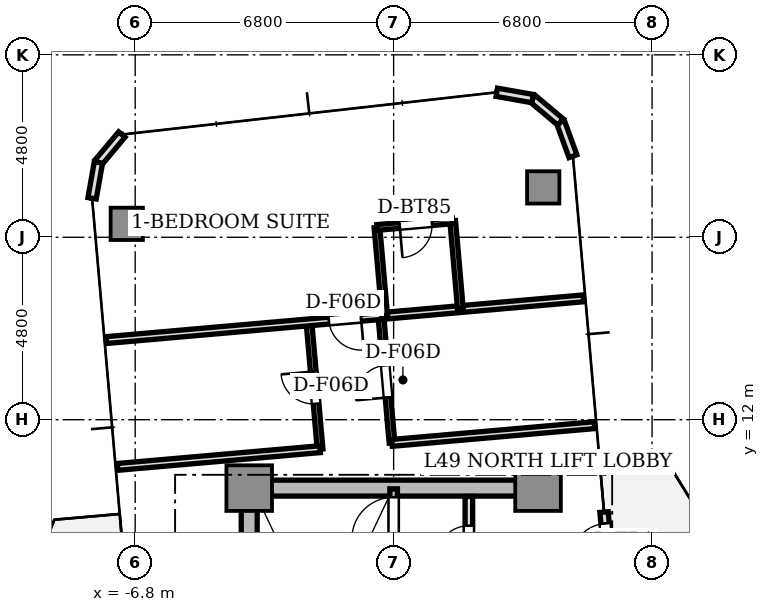
"""IFC4 building model, lengths in metres.
Left out: names, types, materials, properties, quantities, classifications, styles, units other than length and angle.
Written with IfcOpenShell. Run it as: python <this file> out.ifc"""

import sys

from ifc_helpers import new_model, si_unit, direction, frame, frame_2d, origin, origin_2d, place, context, subcontext, project, spatial, rectangle, extrude, source, transform, mapped, element, fill, save


model = new_model("IFC4")
c1 = context("Model", 3, precision=1e-05, world=origin(), true_north=direction((0.0, 1.0)))
c2 = subcontext(c1, "Body", "Model", "MODEL_VIEW")
j1 = project(units=[si_unit("LENGTHUNIT", "METRE"), si_unit("PLANEANGLEUNIT", "RADIAN")], contexts=[c1])
p1 = place(None, origin())
s1 = spatial("IfcSite", under=j1, at=p1, CompositionType="ELEMENT")
p2 = place(p1, origin())
s2 = spatial("IfcBuilding", under=s1, at=p2, CompositionType="ELEMENT")
p3 = place(p2, frame((0.0, 0.0, 178.55)))
s3 = spatial("IfcBuildingStorey", under=s2, at=p3, CompositionType="ELEMENT", Elevation=178.55)
p4 = place(p3, frame((-3.55, 10.2, 0.0), z_axis=(0.0, 0.0, 1.0), x_axis=(1.0, 0.0, 0.0)))
e1 = element("IfcWall", 1, at=p4, inside=s3, PredefinedType="SHEAR", context=c2, shape_type="SweptSolid", body=[
    extrude(rectangle(XDim=7.1, YDim=0.42, at=frame_2d((3.55, 0.0))), origin(), (0.0, 0.0, 1.0), 3.11),
])
p5 = place(p3, frame((-3.8, 2.85, 0.0), z_axis=(0.0, 0.0, 1.0), x_axis=(0.0, 1.0, 0.0)))
e2 = element("IfcWall", 2, at=p5, inside=s3, PredefinedType="SHEAR", context=c2, shape_type="SweptSolid", body=[
    extrude(rectangle(XDim=6.9, YDim=0.42, at=frame_2d((3.45, 0.0))), origin(), (0.0, 0.0, 1.0), 3.11),
])
m1 = source(origin(), c2, "Body", "SweptSolid", [
    extrude(rectangle(XDim=1.2, YDim=1.2, at=origin_2d()), origin(), (0.0, 0.0, 1.0), 3.11),
])
for number, where, z_axis, x_axis in (
    (3, (-3.8, 10.2, 0.0), (0.0, 0.0, 1.0), (1.0, 0.0, 0.0)),
    (4, (3.8, 10.2, 0.0), (0.0, 0.0, 1.0), (1.0, 0.0, 0.0)),
):
    element("IfcColumn", number, at=place(p3, frame(where, z_axis=z_axis, x_axis=x_axis)), inside=s3, PredefinedType="COLUMN", context=c2, shape_type="MappedRepresentation", body=[
        mapped(m1, transform((0.0, 0.0, 0.0), scale=1.0)),
    ])
m2 = source(origin(), c2, "Body", "SweptSolid", [
    extrude(rectangle(XDim=0.85, YDim=0.85, at=origin_2d()), origin(), (0.0, 0.0, 1.0), 3.11),
])
for number, where, z_axis, x_axis in (
    (5, (3.936, 18.112, 0.0), (0.0, 0.0, 1.0), (1.0, 0.0, 0.0)),
    (6, (-7.022, 17.153, 0.0), (0.0, 0.0, 1.0), (1.0, 0.0, 0.0)),
):
    element("IfcColumn", number, at=place(p3, frame(where, z_axis=z_axis, x_axis=x_axis)), inside=s3, PredefinedType="COLUMN", context=c2, shape_type="MappedRepresentation", body=[
        mapped(m2, transform((0.0, 0.0, 0.0), scale=1.0)),
    ])
p6 = place(p3, frame((5.772, 6.879, 0.0), z_axis=(0.0, 0.0, 1.0), x_axis=(-0.087168071984, 0.996193619346, 0.0)))
e7 = element("IfcWall", 7, at=p6, inside=s3, PredefinedType="STANDARD", context=c2, shape_type="SweptSolid", body=[
    extrude(rectangle(XDim=2.7, YDim=0.22, at=frame_2d((1.35, 0.0))), origin(), (0.0, 0.0, 1.0), 3.11),
])
p7 = place(p6, frame((1.4, 0.0, 0.0)))
e8 = element("IfcOpeningElement", 8, at=p7, cuts=e7, PredefinedType="OPENING", context=c2, shape_type="SweptSolid", body=[
    extrude(rectangle(XDim=1.0, YDim=2.2, at=frame_2d((0.5, 1.1))), frame((0.0, 0.12, 0.0), z_axis=(0.0, -1.0, 0.0), x_axis=(1.0, 0.0, 0.0)), (0.0, 0.0, 1.0), 0.24),
])
p8 = place(p3, frame((4.718, 18.933, 0.0), z_axis=(0.0, 0.0, 1.0), x_axis=(-0.34188635151, 0.939741306239, 0.0)))
e9 = element("IfcWall", 9, at=p8, inside=s3, PredefinedType="STANDARD", context=c2, shape_type="SweptSolid", body=[
    extrude(rectangle(XDim=0.958, YDim=0.22, at=frame_2d((0.479, 0.0))), origin(), (0.0, 0.0, 1.0), 3.11),
])
for number, where, z_axis, x_axis in (
    (10, (4.39, 19.833, 0.0), (0.0, 0.0, 1.0), (-0.766, 0.643, 0.0)),
    (11, (3.657, 20.449, 0.0), (0.0, 0.0, 1.0), (-0.985, 0.174, 0.0)),
):
    element("IfcWall", number, at=place(p3, frame(where, z_axis=z_axis, x_axis=x_axis)), inside=s3, PredefinedType="STANDARD", context=c2, shape_type="SweptSolid", body=[
        extrude(rectangle(XDim=0.958, YDim=0.22, at=frame_2d((0.479, 0.0))), origin(), (0.0, 0.0, 1.0), 3.11),
    ])
for number, where, z_axis, x_axis in (
    (12, (-7.152, 19.503, 0.0), (0.0, 0.0, 1.0), (-0.643, -0.766, 0.0)),
    (13, (-7.768, 18.769, 0.0), (0.0, 0.0, 1.0), (-0.174, -0.985, 0.0)),
):
    element("IfcWall", number, at=place(p3, frame(where, z_axis=z_axis, x_axis=x_axis)), inside=s3, PredefinedType="STANDARD", context=c2, shape_type="SweptSolid", body=[
        extrude(rectangle(XDim=0.958, YDim=0.22, at=frame_2d((0.479, 0.0))), origin(), (0.0, 0.0, 1.0), 3.11),
    ])
p9 = place(p3, frame((0.0, 2.5, 0.0), z_axis=(0.0, 0.0, 1.0), x_axis=(0.0, 1.0, 0.0)))
e14 = element("IfcWall", 14, at=p9, inside=s3, PredefinedType="SOLIDWALL", context=c2, shape_type="SweptSolid", body=[
    extrude(rectangle(XDim=7.68, YDim=0.2, at=frame_2d((3.84, 0.0))), origin(), (0.0, 0.0, 1.0), 3.11),
])
p10 = place(p9, frame((6.36, 0.0, 0.0)))
e15 = element("IfcOpeningElement", 15, at=p10, cuts=e14, PredefinedType="OPENING", context=c2, shape_type="SweptSolid", body=[
    extrude(rectangle(XDim=1.1, YDim=2.15, at=frame_2d((0.55, 1.075))), frame((0.0, 0.11, 0.0), z_axis=(0.0, -1.0, 0.0), x_axis=(1.0, 0.0, 0.0)), (0.0, 0.0, 1.0), 0.22),
])
p11 = place(p3, frame((1.98, 5.32, 0.0), z_axis=(0.0, 0.0, 1.0), x_axis=(0.0, 1.0, 0.0)))
e16 = element("IfcWall", 16, at=p11, inside=s3, PredefinedType="SOLIDWALL", context=c2, shape_type="SweptSolid", body=[
    extrude(rectangle(XDim=4.66, YDim=0.2, at=frame_2d((2.33, 0.0))), origin(), (0.0, 0.0, 1.0), 2.66),
])
p12 = place(p11, frame((3.04, 0.0, 0.0)))
e17 = element("IfcOpeningElement", 17, at=p12, cuts=e16, PredefinedType="OPENING", context=c2, shape_type="SweptSolid", body=[
    extrude(rectangle(XDim=0.85, YDim=2.1, at=frame_2d((0.425, 1.05))), frame((0.0, 0.11, 0.0), z_axis=(0.0, -1.0, 0.0), x_axis=(1.0, 0.0, 0.0)), (0.0, 0.0, 1.0), 0.22),
])
p13 = place(p3, frame((-1.936, 11.224, 0.0), z_axis=(0.0, 0.0, 1.0), x_axis=(-0.087164238054, 0.996193954812, 0.0)))
e18 = element("IfcWall", 18, at=p13, inside=s3, PredefinedType="PARTITIONING", context=c2, shape_type="SweptSolid", body=[
    extrude(rectangle(XDim=3.35, YDim=0.15, at=frame_2d((1.675, 0.0))), origin(), (0.0, 0.0, 1.0), 2.66),
])
p14 = place(p13, frame((1.2, 0.0, 0.0)))
e19 = element("IfcOpeningElement", 19, at=p14, cuts=e18, PredefinedType="OPENING", context=c2, shape_type="SweptSolid", body=[
    extrude(rectangle(XDim=0.85, YDim=2.1, at=frame_2d((0.425, 1.05))), frame((0.0, 0.085, 0.0), z_axis=(0.0, -1.0, 0.0), x_axis=(1.0, 0.0, 0.0)), (0.0, 0.0, 1.0), 0.17),
])
p15 = place(p3, frame((-0.043, 11.39, 0.0), z_axis=(0.0, 0.0, 1.0), x_axis=(-0.087164238054, 0.996193954812, 0.0)))
e20 = element("IfcWall", 20, at=p15, inside=s3, PredefinedType="PARTITIONING", context=c2, shape_type="SweptSolid", body=[
    extrude(rectangle(XDim=3.35, YDim=0.15, at=frame_2d((1.675, 0.0))), origin(), (0.0, 0.0, 1.0), 2.66),
])
p16 = place(p15, frame((1.2, 0.0, 0.0)))
e21 = element("IfcOpeningElement", 21, at=p16, cuts=e20, PredefinedType="OPENING", context=c2, shape_type="SweptSolid", body=[
    extrude(rectangle(XDim=0.85, YDim=2.1, at=frame_2d((0.425, 1.05))), frame((0.0, 0.085, 0.0), z_axis=(0.0, -1.0, 0.0), x_axis=(1.0, 0.0, 0.0)), (0.0, 0.0, 1.0), 0.17),
])
for number, where, z_axis, x_axis in (
    (22, (-1.936, 11.224, 0.0), (0.0, 0.0, 1.0), (-0.996, -0.087, 0.0)),
    (23, (5.287, 11.856, 0.0), (0.0, 0.0, 1.0), (-0.996, -0.087, 0.0)),
):
    element("IfcWall", number, at=place(p3, frame(where, z_axis=z_axis, x_axis=x_axis)), inside=s3, PredefinedType="PARTITIONING", context=c2, shape_type="SweptSolid", body=[
        extrude(rectangle(XDim=5.35, YDim=0.18, at=frame_2d((2.675, 0.0))), origin(), (0.0, 0.0, 1.0), 2.66),
    ])
p17 = place(p3, frame((4.995, 15.193, 0.0), z_axis=(0.0, 0.0, 1.0), x_axis=(-0.996194790044, -0.087154691724, 0.0)))
e24 = element("IfcWall", 24, at=p17, inside=s3, PredefinedType="PARTITIONING", context=c2, shape_type="SweptSolid", body=[
    extrude(rectangle(XDim=12.6, YDim=0.18, at=frame_2d((6.3, 0.0))), origin(), (0.0, 0.0, 1.0), 2.66),
])
p18 = place(p17, frame((5.875, 0.0, 0.0)))
e25 = element("IfcOpeningElement", 25, at=p18, cuts=e24, PredefinedType="OPENING", context=c2, shape_type="SweptSolid", body=[
    extrude(rectangle(XDim=0.85, YDim=2.1, at=frame_2d((0.425, 1.05))), frame((0.0, 0.1, 0.0), z_axis=(0.0, -1.0, 0.0), x_axis=(1.0, 0.0, 0.0)), (0.0, 0.0, 1.0), 0.2),
])
for number, where, z_axis, x_axis in (
    (26, (-0.235, 14.736, 0.0), (0.0, 0.0, 1.0), (-0.087, 0.996, 0.0)),
    (27, (1.757, 14.91, 0.0), (0.0, 0.0, 1.0), (-0.087, 0.996, 0.0)),
):
    element("IfcWall", number, at=place(p3, frame(where, z_axis=z_axis, x_axis=x_axis)), inside=s3, PredefinedType="PARTITIONING", context=c2, shape_type="SweptSolid", body=[
        extrude(rectangle(XDim=2.331, YDim=0.15, at=frame_2d((1.166, 0.0))), origin(), (0.0, 0.0, 1.0), 2.66),
    ])
p19 = place(p3, frame((1.554, 17.232, 0.0), z_axis=(0.0, 0.0, 1.0), x_axis=(-0.996193717496, -0.087166950281, 0.0)))
e28 = element("IfcWall", 28, at=p19, inside=s3, PredefinedType="PARTITIONING", context=c2, shape_type="SweptSolid", body=[
    extrude(rectangle(XDim=2.0, YDim=0.15, at=frame_2d((1.0, 0.0))), origin(), (0.0, 0.0, 1.0), 2.66),
])
p20 = place(p19, frame((0.55, 0.0, 0.0)))
e29 = element("IfcOpeningElement", 29, at=p20, cuts=e28, PredefinedType="OPENING", context=c2, shape_type="SweptSolid", body=[
    extrude(rectangle(XDim=0.85, YDim=2.1, at=frame_2d((0.425, 1.05))), frame((0.0, 0.085, 0.0), z_axis=(0.0, -1.0, 0.0), x_axis=(1.0, 0.0, 0.0)), (0.0, 0.0, 1.0), 0.17),
])
m3 = source(origin(), c2, "Body", "SweptSolid", [
    extrude(rectangle(XDim=1.0, YDim=0.05, at=origin_2d()), origin(), (0.0, 0.0, 1.0), 2.2),
])
p21 = place(p7, frame((0.5, 0.0, 0.0)))
e30 = element("IfcDoor", 30, at=p21, inside=s3, OperationType="SINGLE_SWING_LEFT", PredefinedType="DOOR", context=c2, shape_type="MappedRepresentation", body=[
    mapped(m3, transform((0.0, 0.0, 0.0), scale=1.0)),
])
fill(e8, e30)
m4 = source(origin(), c2, "Body", "SweptSolid", [
    extrude(rectangle(XDim=1.1, YDim=0.05, at=origin_2d()), origin(), (0.0, 0.0, 1.0), 2.15),
])
p22 = place(p10, frame((0.55, 0.0, 0.0)))
e31 = element("IfcDoor", 31, at=p22, inside=s3, OperationType="SINGLE_SWING_LEFT", PredefinedType="DOOR", context=c2, shape_type="MappedRepresentation", body=[
    mapped(m4, transform((0.0, 0.0, 0.0), scale=1.0)),
])
fill(e15, e31)
m5 = source(origin(), c2, "Body", "SweptSolid", [
    extrude(rectangle(XDim=0.85, YDim=0.05, at=origin_2d()), origin(), (0.0, 0.0, 1.0), 2.1),
])
p23 = place(p12, frame((0.425, 0.0, 0.0)))
e32 = element("IfcDoor", 32, at=p23, inside=s3, OperationType="SINGLE_SWING_LEFT", PredefinedType="DOOR", context=c2, shape_type="MappedRepresentation", body=[
    mapped(m5, transform((0.0, 0.0, 0.0), scale=1.0)),
])
fill(e17, e32)
p24 = place(p14, frame((0.425, 0.0, 0.0)))
e33 = element("IfcDoor", 33, at=p24, inside=s3, OperationType="SINGLE_SWING_RIGHT", PredefinedType="DOOR", context=c2, shape_type="MappedRepresentation", body=[
    mapped(m5, transform((0.0, 0.0, 0.0), scale=1.0)),
])
fill(e19, e33)
p25 = place(p16, frame((0.425, 0.0, 0.0)))
e34 = element("IfcDoor", 34, at=p25, inside=s3, OperationType="SINGLE_SWING_LEFT", PredefinedType="DOOR", context=c2, shape_type="MappedRepresentation", body=[
    mapped(m5, transform((0.0, 0.0, 0.0), scale=1.0)),
])
fill(e21, e34)
p26 = place(p20, frame((0.425, 0.0, 0.0)))
e35 = element("IfcDoor", 35, at=p26, inside=s3, OperationType="SINGLE_SWING_RIGHT", PredefinedType="DOOR", context=c2, shape_type="MappedRepresentation", body=[
    mapped(m5, transform((0.0, 0.0, 0.0), scale=1.0)),
])
fill(e29, e35)
p27 = place(p18, frame((0.425, 0.0, 0.0)))
e36 = element("IfcDoor", 36, at=p27, inside=s3, OperationType="SINGLE_SWING_LEFT", PredefinedType="DOOR", context=c2, shape_type="MappedRepresentation", body=[
    mapped(m5, transform((0.0, 0.0, 0.0), scale=1.0)),
])
fill(e25, e36)
save(model, sys.argv[1])
